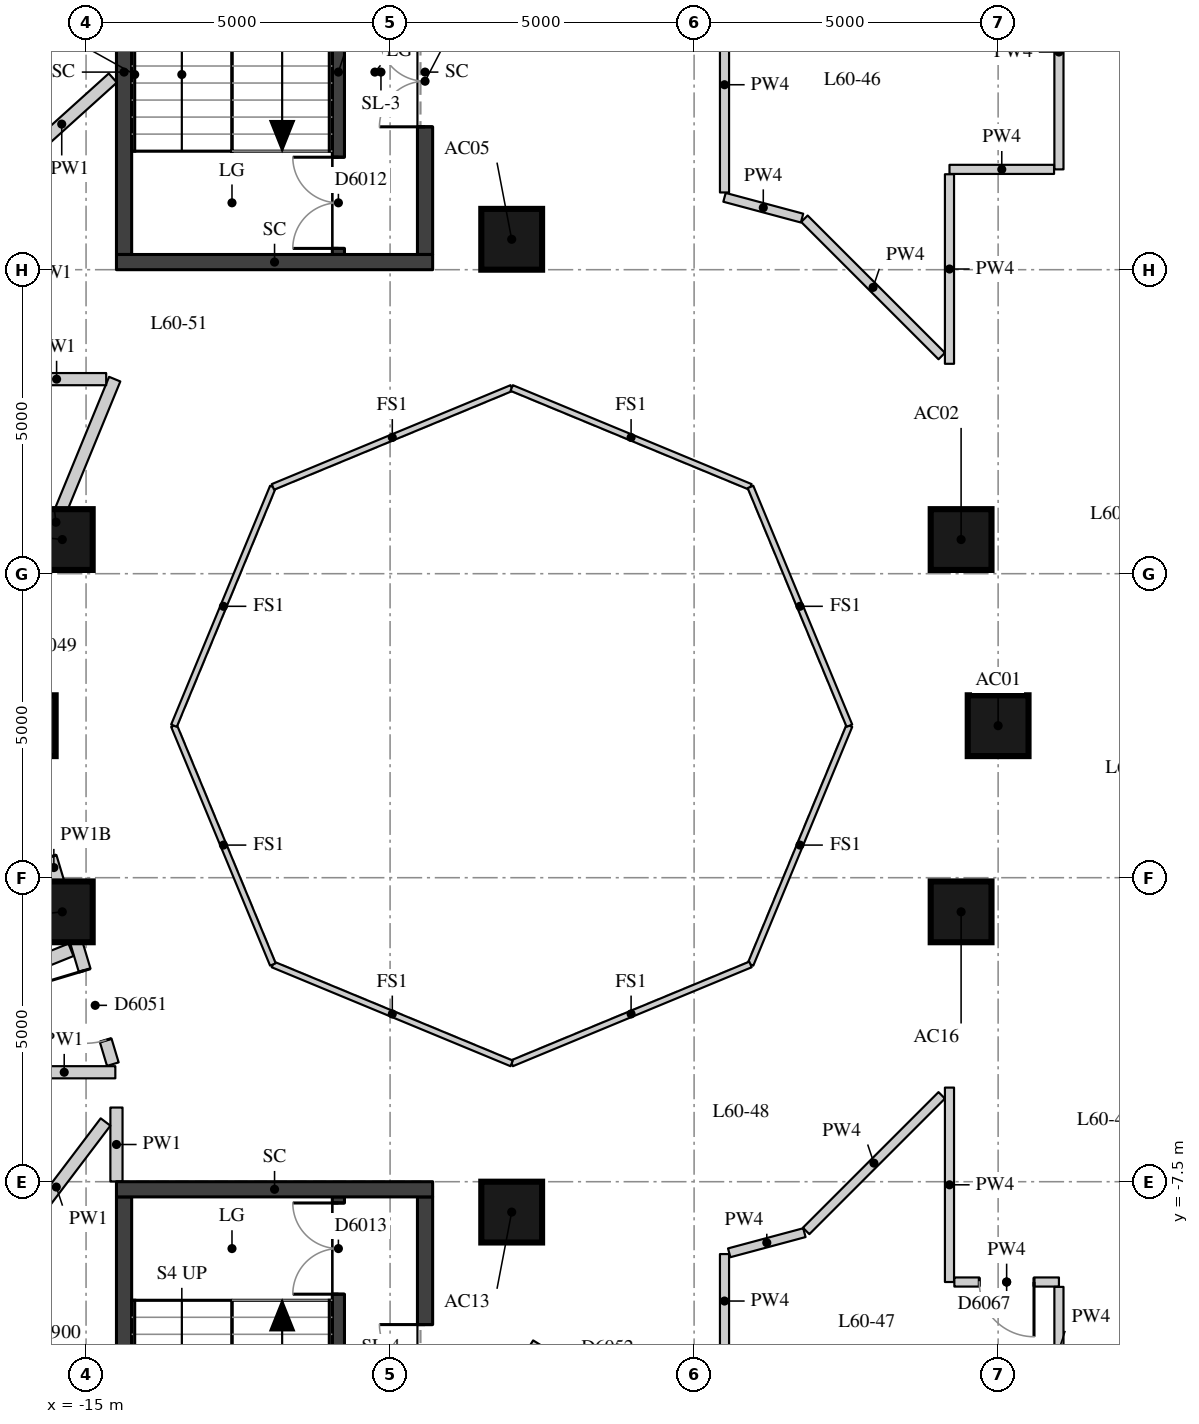
"""IFC4 building model, lengths in metres.
Left out: names, types, materials, properties, quantities, classifications, styles, units other than length and angle.
Written with IfcOpenShell. Run it as: python <this file> out.ifc"""

import sys

from ifc_helpers import new_model, si_unit, direction, frame, frame_2d, origin, origin_2d, place, context, subcontext, project, spatial, rectangle, extrude, element, fill, save


model = new_model("IFC4")
c1 = context("Model", 3, precision=1e-05, world=origin(), true_north=direction((0.0, 1.0)))
c2 = subcontext(c1, "Body", "Model", "MODEL_VIEW")
j1 = project(units=[si_unit("LENGTHUNIT", "METRE"), si_unit("PLANEANGLEUNIT", "RADIAN")], contexts=[c1])
p1 = place(None, origin())
s1 = spatial("IfcSite", under=j1, at=p1, CompositionType="ELEMENT")
p2 = place(p1, origin())
s2 = spatial("IfcBuilding", under=s1, at=p2, CompositionType="ELEMENT")
p3 = place(p2, frame((0.0, 0.0, 212.3)))
s3 = spatial("IfcBuildingStorey", under=s2, at=p3, CompositionType="ELEMENT", Elevation=212.3)
for number, where, z_axis, x_axis in (
    (1, (0.0, 0.0, 0.0), (0.0, 0.0, 1.0), (1.0, 0.0, 0.0)),
    (2, (-0.609, 3.062, 0.0), (0.0, 0.0, 1.0), (1.0, 0.0, 0.0)),
    (3, (-8.0, 8.0, 0.0), (0.0, 0.0, 1.0), (1.0, 0.0, 0.0)),
    (4, (-15.391, 3.062, 0.0), (0.0, 0.0, 1.0), (1.0, 0.0, 0.0)),
    (5, (-16.0, 0.0, 0.0), (0.0, 0.0, 1.0), (1.0, 0.0, 0.0)),
    (6, (-15.391, -3.062, 0.0), (0.0, 0.0, 1.0), (1.0, 0.0, 0.0)),
    (7, (-8.0, -8.0, 0.0), (0.0, 0.0, 1.0), (1.0, 0.0, 0.0)),
    (8, (-0.609, -3.062, 0.0), (0.0, 0.0, 1.0), (1.0, 0.0, 0.0)),
):
    element("IfcColumn", number, at=place(p3, frame(where, z_axis=z_axis, x_axis=x_axis)), inside=s3, PredefinedType="COLUMN", context=c2, shape_type="SweptSolid", body=[
        extrude(rectangle(XDim=1.0, YDim=1.0, at=origin_2d()), origin(), (0.0, 0.0, 1.0), 3.3),
    ])
p4 = place(p3, frame((-10.85, 7.75, 0.0), z_axis=(0.0, 0.0, 1.0), x_axis=(0.0, 1.0, 0.0)))
e9 = element("IfcWall", 9, at=p4, inside=s3, PredefinedType="SHEAR", context=c2, shape_type="SweptSolid", body=[
    extrude(rectangle(XDim=6.0, YDim=0.2, at=frame_2d((3.0, 0.0))), origin(), (0.0, 0.0, 1.0), 3.02),
])
p5 = place(p4, frame((0.1, 0.0, 0.0)))
e10 = element("IfcOpeningElement", 10, at=p5, cuts=e9, PredefinedType="OPENING", context=c2, shape_type="SweptSolid", body=[
    extrude(rectangle(XDim=1.5, YDim=2.1, at=frame_2d((0.75, 1.05))), frame((0.0, 0.11, 0.0), z_axis=(0.0, -1.0, 0.0), x_axis=(1.0, 0.0, 0.0)), (0.0, 0.0, 1.0), 0.22),
])
p6 = place(p3, frame((-10.85, -13.75, 0.0), z_axis=(0.0, 0.0, 1.0), x_axis=(0.0, 1.0, 0.0)))
e11 = element("IfcWall", 11, at=p6, inside=s3, PredefinedType="SHEAR", context=c2, shape_type="SweptSolid", body=[
    extrude(rectangle(XDim=6.0, YDim=0.2, at=frame_2d((3.0, 0.0))), origin(), (0.0, 0.0, 1.0), 3.02),
])
p7 = place(p6, frame((4.4, 0.0, 0.0)))
e12 = element("IfcOpeningElement", 12, at=p7, cuts=e11, PredefinedType="OPENING", context=c2, shape_type="SweptSolid", body=[
    extrude(rectangle(XDim=1.5, YDim=2.1, at=frame_2d((0.75, 1.05))), frame((0.0, 0.11, 0.0), z_axis=(0.0, -1.0, 0.0), x_axis=(1.0, 0.0, 0.0)), (0.0, 0.0, 1.0), 0.22),
])
p8 = place(p3, frame((-14.375, 7.75, -0.28), z_axis=(0.0, 0.0, 1.0), x_axis=(0.0, 1.0, 0.0)))
e13 = element("IfcWall", 13, at=p8, inside=s3, PredefinedType="SHEAR", context=c2, shape_type="SweptSolid", body=[
    extrude(rectangle(XDim=6.0, YDim=0.25, at=frame_2d((3.0, 0.0))), origin(), (0.0, 0.0, 1.0), 3.3),
])
p9 = place(p3, frame((-9.425, 7.75, -0.28), z_axis=(0.0, 0.0, 1.0), x_axis=(0.0, 1.0, 0.0)))
e14 = element("IfcWall", 14, at=p9, inside=s3, PredefinedType="SHEAR", context=c2, shape_type="SweptSolid", body=[
    extrude(rectangle(XDim=6.0, YDim=0.25, at=frame_2d((3.0, 0.0))), origin(), (0.0, 0.0, 1.0), 3.3),
])
p10 = place(p9, frame((2.1, 0.0, 0.28)))
e15 = element("IfcOpeningElement", 15, at=p10, cuts=e14, PredefinedType="OPENING", context=c2, shape_type="SweptSolid", body=[
    extrude(rectangle(XDim=1.5, YDim=2.1, at=frame_2d((0.75, 1.05))), frame((0.0, 0.135, 0.0), z_axis=(0.0, -1.0, 0.0), x_axis=(1.0, 0.0, 0.0)), (0.0, 0.0, 1.0), 0.27),
])
p11 = place(p3, frame((-14.5, 7.625, -0.28), z_axis=(0.0, 0.0, 1.0), x_axis=(1.0, 0.0, 0.0)))
e16 = element("IfcWall", 16, at=p11, inside=s3, PredefinedType="SHEAR", context=c2, shape_type="SweptSolid", body=[
    extrude(rectangle(XDim=5.2, YDim=0.25, at=frame_2d((2.6, 0.0))), origin(), (0.0, 0.0, 1.0), 3.3),
])
p12 = place(p3, frame((-14.375, -13.75, -0.28), z_axis=(0.0, 0.0, 1.0), x_axis=(0.0, 1.0, 0.0)))
e17 = element("IfcWall", 17, at=p12, inside=s3, PredefinedType="SHEAR", context=c2, shape_type="SweptSolid", body=[
    extrude(rectangle(XDim=6.0, YDim=0.25, at=frame_2d((3.0, 0.0))), origin(), (0.0, 0.0, 1.0), 3.3),
])
p13 = place(p3, frame((-9.425, -13.75, -0.28), z_axis=(0.0, 0.0, 1.0), x_axis=(0.0, 1.0, 0.0)))
e18 = element("IfcWall", 18, at=p13, inside=s3, PredefinedType="SHEAR", context=c2, shape_type="SweptSolid", body=[
    extrude(rectangle(XDim=6.0, YDim=0.25, at=frame_2d((3.0, 0.0))), origin(), (0.0, 0.0, 1.0), 3.3),
])
p14 = place(p13, frame((2.4, 0.0, 0.28)))
e19 = element("IfcOpeningElement", 19, at=p14, cuts=e18, PredefinedType="OPENING", context=c2, shape_type="SweptSolid", body=[
    extrude(rectangle(XDim=1.5, YDim=2.1, at=frame_2d((0.75, 1.05))), frame((0.0, 0.135, 0.0), z_axis=(0.0, -1.0, 0.0), x_axis=(1.0, 0.0, 0.0)), (0.0, 0.0, 1.0), 0.27),
])
p15 = place(p3, frame((-14.5, -7.625, -0.28), z_axis=(0.0, 0.0, 1.0), x_axis=(1.0, 0.0, 0.0)))
e20 = element("IfcWall", 20, at=p15, inside=s3, PredefinedType="SHEAR", context=c2, shape_type="SweptSolid", body=[
    extrude(rectangle(XDim=5.2, YDim=0.25, at=frame_2d((2.6, 0.0))), origin(), (0.0, 0.0, 1.0), 3.3),
])
p16 = place(p3, frame((-2.528, -13.4, 0.0), z_axis=(0.0, 0.0, 1.0), x_axis=(-0.850088088191, 0.526640524757, 0.0)))
e21 = element("IfcWall", 21, at=p16, inside=s3, PredefinedType="PARTITIONING", context=c2, shape_type="SweptSolid", body=[
    extrude(rectangle(XDim=6.084, YDim=0.2, at=frame_2d((3.042, 0.0))), origin(), (0.0, 0.0, 1.0), 3.02),
])
p17 = place(p16, frame((4.031, 0.0, 0.0)))
e22 = element("IfcOpeningElement", 22, at=p17, cuts=e21, PredefinedType="OPENING", context=c2, shape_type="SweptSolid", body=[
    extrude(rectangle(XDim=1.1, YDim=2.1, at=frame_2d((0.55, 1.05))), frame((0.0, 0.11, 0.0), z_axis=(0.0, -1.0, 0.0), x_axis=(1.0, 0.0, 0.0)), (0.0, 0.0, 1.0), 0.22),
])
p18 = place(p16, frame((1.206, 0.0, 0.0)))
e23 = element("IfcOpeningElement", 23, at=p18, cuts=e21, PredefinedType="OPENING", context=c2, shape_type="SweptSolid", body=[
    extrude(rectangle(XDim=0.9, YDim=2.1, at=frame_2d((0.45, 1.05))), frame((0.0, 0.11, 0.0), z_axis=(0.0, -1.0, 0.0), x_axis=(1.0, 0.0, 0.0)), (0.0, 0.0, 1.0), 0.22),
])
p19 = place(p3, frame((-14.5, -7.496, 0.0), z_axis=(0.0, 0.0, 1.0), x_axis=(0.0, 1.0, 0.0)))
e24 = element("IfcWall", 24, at=p19, inside=s3, PredefinedType="PARTITIONING", context=c2, shape_type="SweptSolid", body=[
    extrude(rectangle(XDim=1.216, YDim=0.2, at=frame_2d((0.608, 0.0))), origin(), (0.0, 0.0, 1.0), 3.02),
])
p20 = place(p3, frame((-14.679, -6.518, 0.0), z_axis=(0.0, 0.0, 1.0), x_axis=(-0.603820908912, -0.797120009761, 0.0)))
e25 = element("IfcWall", 25, at=p20, inside=s3, PredefinedType="PARTITIONING", context=c2, shape_type="SweptSolid", body=[
    extrude(rectangle(XDim=2.684, YDim=0.2, at=frame_2d((1.342, 0.0))), origin(), (0.0, 0.0, 1.0), 3.02),
])
p21 = place(p3, frame((-16.2, -5.7, 0.0), z_axis=(0.0, 0.0, 1.0), x_axis=(1.0, 0.0, 0.0)))
e26 = element("IfcWall", 26, at=p21, inside=s3, PredefinedType="PARTITIONING", context=c2, shape_type="SweptSolid", body=[
    extrude(rectangle(XDim=1.681, YDim=0.2, at=frame_2d((0.841, 0.0))), origin(), (0.0, 0.0, 1.0), 3.02),
])
p22 = place(p3, frame((-14.56, -5.567, 0.0), z_axis=(0.0, 0.0, 1.0), x_axis=(-0.287410918602, 0.95780737305, 0.0)))
e27 = element("IfcWall", 27, at=p22, inside=s3, PredefinedType="PARTITIONING", context=c2, shape_type="SweptSolid", body=[
    extrude(rectangle(XDim=6.751, YDim=0.2, at=frame_2d((3.376, 0.0))), origin(), (0.0, 0.0, 1.0), 2.52),
])
p23 = place(p22, frame((3.561, 0.0, 0.0)))
e28 = element("IfcOpeningElement", 28, at=p23, cuts=e27, PredefinedType="OPENING", context=c2, shape_type="SweptSolid", body=[
    extrude(rectangle(XDim=1.1, YDim=2.1, at=frame_2d((0.55, 1.05))), frame((0.0, 0.11, 0.0), z_axis=(0.0, -1.0, 0.0), x_axis=(1.0, 0.0, 0.0)), (0.0, 0.0, 1.0), 0.22),
])
p24 = place(p22, frame((0.41, 0.0, 0.0)))
e29 = element("IfcOpeningElement", 29, at=p24, cuts=e27, PredefinedType="OPENING", context=c2, shape_type="SweptSolid", body=[
    extrude(rectangle(XDim=1.2, YDim=2.1, at=frame_2d((0.6, 1.05))), frame((0.0, 0.11, 0.0), z_axis=(0.0, -1.0, 0.0), x_axis=(1.0, 0.0, 0.0)), (0.0, 0.0, 1.0), 0.22),
])
p25 = place(p3, frame((-16.462, 0.993, 0.0), z_axis=(0.0, 0.0, 1.0), x_axis=(0.37991958703, 0.925019517303, 0.0)))
e30 = element("IfcWall", 30, at=p25, inside=s3, PredefinedType="PARTITIONING", context=c2, shape_type="SweptSolid", body=[
    extrude(rectangle(XDim=5.089, YDim=0.2, at=frame_2d((2.544, 0.0))), origin(), (0.0, 0.0, 1.0), 2.52),
])
p26 = place(p25, frame((0.36, 0.0, 0.0)))
e31 = element("IfcOpeningElement", 31, at=p26, cuts=e30, PredefinedType="OPENING", context=c2, shape_type="SweptSolid", body=[
    extrude(rectangle(XDim=1.1, YDim=2.1, at=frame_2d((0.55, 1.05))), frame((0.0, 0.11, 0.0), z_axis=(0.0, -1.0, 0.0), x_axis=(1.0, 0.0, 0.0)), (0.0, 0.0, 1.0), 0.22),
])
p27 = place(p3, frame((-14.669, 5.7, 0.0), z_axis=(0.0, 0.0, 1.0), x_axis=(-1.0, 0.0, 0.0)))
e32 = element("IfcWall", 32, at=p27, inside=s3, PredefinedType="PARTITIONING", context=c2, shape_type="SweptSolid", body=[
    extrude(rectangle(XDim=1.631, YDim=0.2, at=frame_2d((0.815, 0.0))), origin(), (0.0, 0.0, 1.0), 3.02),
])
p28 = place(p3, frame((-16.24, 9.136, 0.0), z_axis=(0.0, 0.0, 1.0), x_axis=(0.74251608424, 0.66982823518, 0.0)))
e33 = element("IfcWall", 33, at=p28, inside=s3, PredefinedType="PARTITIONING", context=c2, shape_type="SweptSolid", body=[
    extrude(rectangle(XDim=2.264, YDim=0.2, at=frame_2d((1.132, 0.0))), origin(), (0.0, 0.0, 1.0), 3.02),
])
p29 = place(p3, frame((1.0, 13.011, 0.0), z_axis=(0.0, 0.0, 1.0), x_axis=(0.0, -1.0, 0.0)))
e34 = element("IfcWall", 34, at=p29, inside=s3, PredefinedType="PARTITIONING", context=c2, shape_type="SweptSolid", body=[
    extrude(rectangle(XDim=3.861, YDim=0.15, at=frame_2d((1.93, 0.0))), origin(), (0.0, 0.0, 1.0), 3.02),
])
p30 = place(p3, frame((0.92, 9.15, 0.0), z_axis=(0.0, 0.0, 1.0), x_axis=(-1.0, 0.0, 0.0)))
e35 = element("IfcWall", 35, at=p30, inside=s3, PredefinedType="PARTITIONING", context=c2, shape_type="SweptSolid", body=[
    extrude(rectangle(XDim=1.72, YDim=0.15, at=frame_2d((0.86, 0.0))), origin(), (0.0, 0.0, 1.0), 3.02),
])
p31 = place(p3, frame((-0.8, 9.07, 0.0), z_axis=(0.0, 0.0, 1.0), x_axis=(0.0, -1.0, 0.0)))
e36 = element("IfcWall", 36, at=p31, inside=s3, PredefinedType="PARTITIONING", context=c2, shape_type="SweptSolid", body=[
    extrude(rectangle(XDim=3.118, YDim=0.15, at=frame_2d((1.559, 0.0))), origin(), (0.0, 0.0, 1.0), 3.02),
])
p32 = place(p3, frame((-0.927, 6.08, 0.0), z_axis=(0.0, 0.0, 1.0), x_axis=(-0.707106781187, 0.707106781187, 0.0)))
e37 = element("IfcWall", 37, at=p32, inside=s3, PredefinedType="PARTITIONING", context=c2, shape_type="SweptSolid", body=[
    extrude(rectangle(XDim=3.194, YDim=0.15, at=frame_2d((1.597, 0.0))), origin(), (0.0, 0.0, 1.0), 3.02),
])
p33 = place(p3, frame((-3.225, 8.348, 0.0), z_axis=(0.0, 0.0, 1.0), x_axis=(-0.965915035697, 0.258859312783, 0.0)))
e38 = element("IfcWall", 38, at=p33, inside=s3, PredefinedType="PARTITIONING", context=c2, shape_type="SweptSolid", body=[
    extrude(rectangle(XDim=1.32, YDim=0.15, at=frame_2d((0.66, 0.0))), origin(), (0.0, 0.0, 1.0), 3.02),
])
p34 = place(p3, frame((-4.5, 8.77, 0.0), z_axis=(0.0, 0.0, 1.0), x_axis=(0.0, 1.0, 0.0)))
e39 = element("IfcWall", 39, at=p34, inside=s3, PredefinedType="PARTITIONING", context=c2, shape_type="SweptSolid", body=[
    extrude(rectangle(XDim=3.543, YDim=0.15, at=frame_2d((1.772, 0.0))), origin(), (0.0, 0.0, 1.0), 3.02),
])
p35 = place(p3, frame((-0.8, -5.952, 0.0), z_axis=(0.0, 0.0, 1.0), x_axis=(0.0, -1.0, 0.0)))
e40 = element("IfcWall", 40, at=p35, inside=s3, PredefinedType="PARTITIONING", context=c2, shape_type="SweptSolid", body=[
    extrude(rectangle(XDim=3.198, YDim=0.15, at=frame_2d((1.599, 0.0))), origin(), (0.0, 0.0, 1.0), 3.02),
])
p36 = place(p3, frame((-0.72, -9.15, 0.0), z_axis=(0.0, 0.0, 1.0), x_axis=(1.0, 0.0, 0.0)))
e41 = element("IfcWall", 41, at=p36, inside=s3, PredefinedType="PARTITIONING", context=c2, shape_type="SweptSolid", body=[
    extrude(rectangle(XDim=1.72, YDim=0.15, at=frame_2d((0.86, 0.0))), origin(), (0.0, 0.0, 1.0), 3.02),
])
p37 = place(p36, frame((0.41, 0.0, 0.0)))
e42 = element("IfcOpeningElement", 42, at=p37, cuts=e41, PredefinedType="OPENING", context=c2, shape_type="SweptSolid", body=[
    extrude(rectangle(XDim=0.9, YDim=2.1, at=frame_2d((0.45, 1.05))), frame((0.0, 0.085, 0.0), z_axis=(0.0, -1.0, 0.0), x_axis=(1.0, 0.0, 0.0)), (0.0, 0.0, 1.0), 0.17),
])
p38 = place(p3, frame((1.0, -9.23, 0.0), z_axis=(0.0, 0.0, 1.0), x_axis=(0.0, -1.0, 0.0)))
e43 = element("IfcWall", 43, at=p38, inside=s3, PredefinedType="PARTITIONING", context=c2, shape_type="SweptSolid", body=[
    extrude(rectangle(XDim=2.061, YDim=0.15, at=frame_2d((1.03, 0.0))), origin(), (0.0, 0.0, 1.0), 3.02),
])
p39 = place(p3, frame((-4.5, -10.235, 0.0), z_axis=(0.0, 0.0, 1.0), x_axis=(0.0, 1.0, 0.0)))
e44 = element("IfcWall", 44, at=p39, inside=s3, PredefinedType="PARTITIONING", context=c2, shape_type="SweptSolid", body=[
    extrude(rectangle(XDim=1.545, YDim=0.15, at=frame_2d((0.772, 0.0))), origin(), (0.0, 0.0, 1.0), 3.02),
])
p40 = place(p3, frame((-4.423, -8.67, 0.0), z_axis=(0.0, 0.0, 1.0), x_axis=(0.965898680525, 0.258920333232, 0.0)))
e45 = element("IfcWall", 45, at=p40, inside=s3, PredefinedType="PARTITIONING", context=c2, shape_type="SweptSolid", body=[
    extrude(rectangle(XDim=1.281, YDim=0.15, at=frame_2d((0.64, 0.0))), origin(), (0.0, 0.0, 1.0), 3.02),
])
p41 = place(p3, frame((-3.158, -8.31, 0.0), z_axis=(0.0, 0.0, 1.0), x_axis=(0.707106781187, 0.707106781187, 0.0)))
e46 = element("IfcWall", 46, at=p41, inside=s3, PredefinedType="PARTITIONING", context=c2, shape_type="SweptSolid", body=[
    extrude(rectangle(XDim=3.154, YDim=0.15, at=frame_2d((1.577, 0.0))), origin(), (0.0, 0.0, 1.0), 3.02),
])
p42 = place(p3, frame((-22.896, -6.771, 0.0), z_axis=(0.0, 0.0, 1.0), x_axis=(0.92738233242, 0.374114968313, 0.0)))
e47 = element("IfcWall", 47, at=p42, inside=s3, PredefinedType="PARTITIONING", context=c2, shape_type="SweptSolid", body=[
    extrude(rectangle(XDim=8.246, YDim=0.22, at=frame_2d((4.123, 0.0))), origin(), (0.0, 0.0, 1.0), 3.02),
])
for number, where, z_axis, x_axis in (
    (48, (-2.446, 0.0, 0.0), (0.0, 0.0, 1.0), (-0.383, -0.924, 0.0)),
    (49, (-4.073, -3.927, 0.0), (0.0, 0.0, 1.0), (-0.924, -0.383, 0.0)),
    (50, (-8.0, -5.554, 0.0), (0.0, 0.0, 1.0), (-0.924, 0.383, 0.0)),
    (51, (-11.927, -3.927, 0.0), (0.0, 0.0, 1.0), (-0.383, 0.924, 0.0)),
    (52, (-13.554, 0.0, 0.0), (0.0, 0.0, 1.0), (0.383, 0.924, 0.0)),
    (53, (-11.927, 3.927, 0.0), (0.0, 0.0, 1.0), (0.924, 0.383, 0.0)),
    (54, (-8.0, 5.554, 0.0), (0.0, 0.0, 1.0), (0.924, -0.383, 0.0)),
    (55, (-4.073, 3.927, 0.0), (0.0, 0.0, 1.0), (0.383, -0.924, 0.0)),
):
    element("IfcWall", number, at=place(p3, frame(where, z_axis=z_axis, x_axis=x_axis)), inside=s3, PredefinedType="PARTITIONING", context=c2, shape_type="SweptSolid", body=[
        extrude(rectangle(XDim=4.251, YDim=0.1, at=frame_2d((2.125, 0.0))), origin(), (0.0, 0.0, 1.0), 3.02),
    ])
p43 = place(p5, origin())
e56 = element("IfcDoor", 56, at=p43, inside=s3, OperationType="DOUBLE_DOOR_SINGLE_SWING", PredefinedType="DOOR", context=c2, shape_type="SweptSolid", body=[
    extrude(rectangle(XDim=1.5, YDim=2.1, at=frame_2d((0.75, 1.05))), frame((0.0, 0.025, 0.0), z_axis=(0.0, -1.0, 0.0), x_axis=(1.0, 0.0, 0.0)), (0.0, 0.0, 1.0), 0.05),
])
fill(e10, e56)
p44 = place(p7, origin())
e57 = element("IfcDoor", 57, at=p44, inside=s3, OperationType="DOUBLE_DOOR_SINGLE_SWING", PredefinedType="DOOR", context=c2, shape_type="SweptSolid", body=[
    extrude(rectangle(XDim=1.5, YDim=2.1, at=frame_2d((0.75, 1.05))), frame((0.0, 0.025, 0.0), z_axis=(0.0, -1.0, 0.0), x_axis=(1.0, 0.0, 0.0)), (0.0, 0.0, 1.0), 0.05),
])
fill(e12, e57)
p45 = place(p10, origin())
e58 = element("IfcDoor", 58, at=p45, inside=s3, OperationType="DOUBLE_DOOR_SINGLE_SWING", PredefinedType="DOOR", context=c2, shape_type="SweptSolid", body=[
    extrude(rectangle(XDim=1.5, YDim=2.1, at=frame_2d((0.75, 1.05))), frame((0.0, 0.025, 0.0), z_axis=(0.0, -1.0, 0.0), x_axis=(1.0, 0.0, 0.0)), (0.0, 0.0, 1.0), 0.05),
])
fill(e15, e58)
p46 = place(p14, origin())
e59 = element("IfcDoor", 59, at=p46, inside=s3, OperationType="DOUBLE_DOOR_SINGLE_SWING", PredefinedType="DOOR", context=c2, shape_type="SweptSolid", body=[
    extrude(rectangle(XDim=1.5, YDim=2.1, at=frame_2d((0.75, 1.05))), frame((0.0, 0.025, 0.0), z_axis=(0.0, -1.0, 0.0), x_axis=(1.0, 0.0, 0.0)), (0.0, 0.0, 1.0), 0.05),
])
fill(e19, e59)
p47 = place(p24, origin())
e60 = element("IfcDoor", 60, at=p47, inside=s3, OperationType="SINGLE_SWING_RIGHT", PredefinedType="DOOR", context=c2, shape_type="SweptSolid", body=[
    extrude(rectangle(XDim=1.2, YDim=2.1, at=frame_2d((0.6, 1.05))), frame((0.0, 0.025, 0.0), z_axis=(0.0, -1.0, 0.0), x_axis=(1.0, 0.0, 0.0)), (0.0, 0.0, 1.0), 0.05),
])
fill(e29, e60)
p48 = place(p37, origin())
e61 = element("IfcDoor", 61, at=p48, inside=s3, OperationType="SINGLE_SWING_LEFT", PredefinedType="DOOR", context=c2, shape_type="SweptSolid", body=[
    extrude(rectangle(XDim=0.9, YDim=2.1, at=frame_2d((0.45, 1.05))), frame((0.0, 0.025, 0.0), z_axis=(0.0, -1.0, 0.0), x_axis=(1.0, 0.0, 0.0)), (0.0, 0.0, 1.0), 0.05),
])
fill(e42, e61)
save(model, sys.argv[1])
